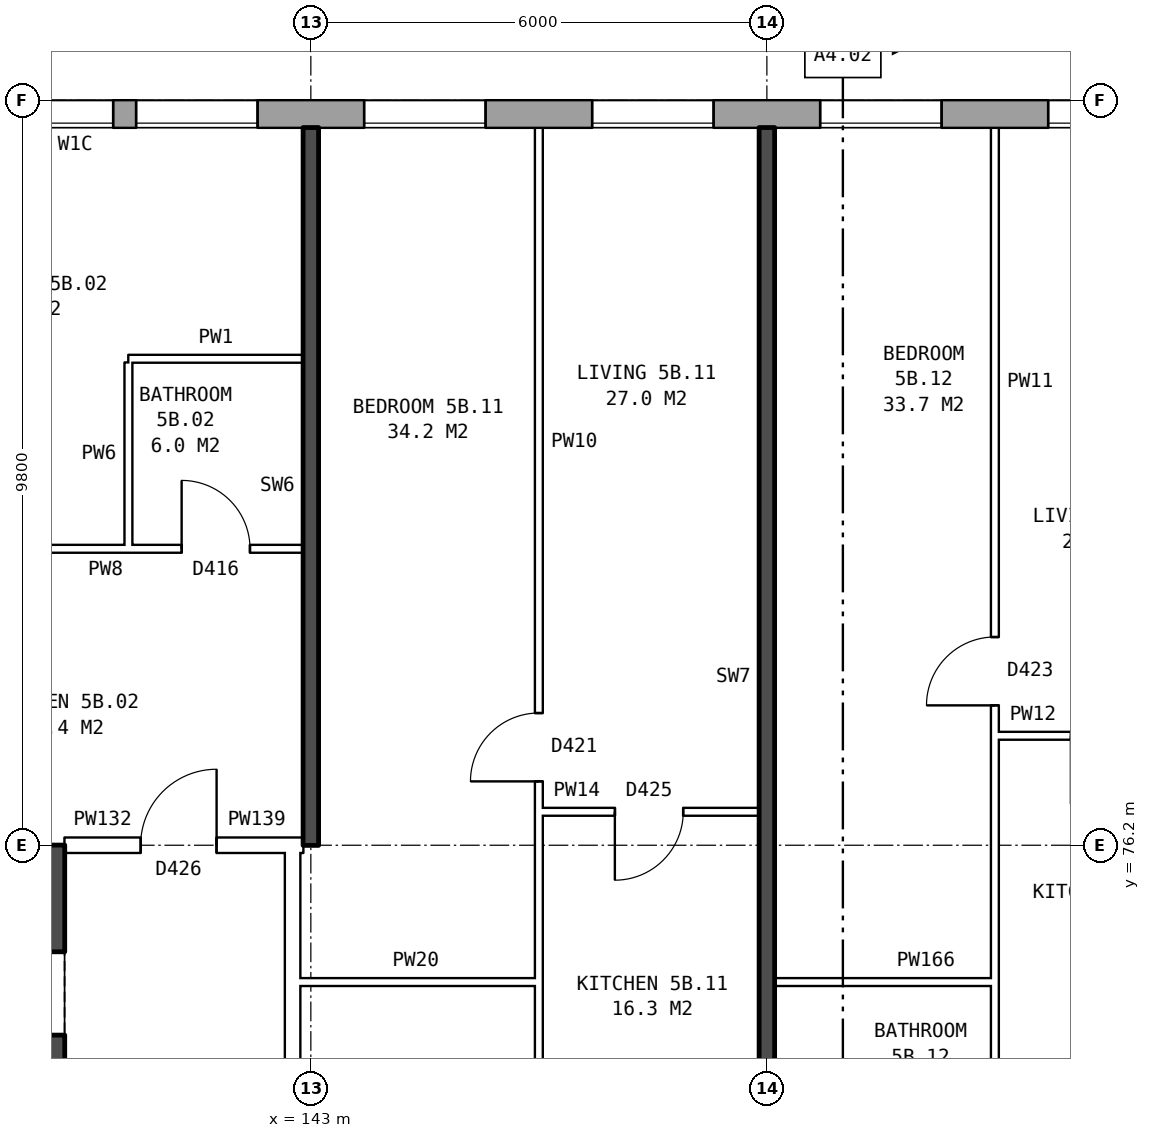
"""IFC4 building model, lengths in metres.
Left out: names, types, materials, properties, quantities, classifications, styles, units other than length and angle.
Written with IfcOpenShell. Run it as: python <this file> out.ifc"""

import sys

from ifc_helpers import new_model, si_unit, direction, frame, frame_2d, origin, place, context, subcontext, project, spatial, rectangle, extrude, element, fill, save


model = new_model("IFC4")
c1 = context("Model", 3, precision=1e-05, world=origin(), true_north=direction((0.0, 1.0)))
c2 = subcontext(c1, "Body", "Model", "MODEL_VIEW")
j1 = project(units=[si_unit("LENGTHUNIT", "METRE"), si_unit("PLANEANGLEUNIT", "RADIAN")], contexts=[c1])
p1 = place(None, origin())
s1 = spatial("IfcSite", under=j1, at=p1, CompositionType="ELEMENT")
p2 = place(p1, origin())
s2 = spatial("IfcBuilding", under=s1, at=p2, CompositionType="ELEMENT")
p3 = place(p2, frame((0.0, 0.0, 22.6)))
s3 = spatial("IfcBuildingStorey", under=s2, at=p3, CompositionType="ELEMENT", Elevation=22.6)
p4 = place(p3, frame((174.675, 85.82, 0.0), z_axis=(0.0, 0.0, 1.0), x_axis=(-1.0, 0.0, 0.0)))
e1 = element("IfcWall", 1, at=p4, inside=s3, PredefinedType="STANDARD", context=c2, shape_type="SweptSolid", body=[
    extrude(rectangle(XDim=40.601, YDim=0.36, at=frame_2d((20.3, 0.0))), origin(), (0.0, 0.0, 1.0), 2.85),
])
p5 = place(p4, frame((1.875, 0.0, 1.7)))
e2 = element("IfcOpeningElement", 2, at=p5, cuts=e1, PredefinedType="OPENING", context=c2, shape_type="SweptSolid", body=[
    extrude(rectangle(XDim=1.0, YDim=0.9, at=frame_2d((0.5, 0.45))), frame((0.0, 0.19, 0.0), z_axis=(0.0, -1.0, 0.0), x_axis=(1.0, 0.0, 0.0)), (0.0, 0.0, 1.0), 0.38),
])
p6 = place(p4, frame((5.375, 0.0, 0.8)))
e3 = element("IfcOpeningElement", 3, at=p6, cuts=e1, PredefinedType="OPENING", context=c2, shape_type="SweptSolid", body=[
    extrude(rectangle(XDim=1.6, YDim=1.8, at=frame_2d((0.8, 0.9))), frame((0.0, 0.19, 0.0), z_axis=(0.0, -1.0, 0.0), x_axis=(1.0, 0.0, 0.0)), (0.0, 0.0, 1.0), 0.38),
])
p7 = place(p4, frame((8.375, 0.0, 0.8)))
e4 = element("IfcOpeningElement", 4, at=p7, cuts=e1, PredefinedType="OPENING", context=c2, shape_type="SweptSolid", body=[
    extrude(rectangle(XDim=1.6, YDim=1.8, at=frame_2d((0.8, 0.9))), frame((0.0, 0.19, 0.0), z_axis=(0.0, -1.0, 0.0), x_axis=(1.0, 0.0, 0.0)), (0.0, 0.0, 1.0), 0.38),
])
p8 = place(p4, frame((11.375, 0.0, 0.8)))
e5 = element("IfcOpeningElement", 5, at=p8, cuts=e1, PredefinedType="OPENING", context=c2, shape_type="SweptSolid", body=[
    extrude(rectangle(XDim=1.6, YDim=1.8, at=frame_2d((0.8, 0.9))), frame((0.0, 0.19, 0.0), z_axis=(0.0, -1.0, 0.0), x_axis=(1.0, 0.0, 0.0)), (0.0, 0.0, 1.0), 0.38),
])
p9 = place(p4, frame((14.375, 0.0, 0.8)))
e6 = element("IfcOpeningElement", 6, at=p9, cuts=e1, PredefinedType="OPENING", context=c2, shape_type="SweptSolid", body=[
    extrude(rectangle(XDim=1.6, YDim=1.8, at=frame_2d((0.8, 0.9))), frame((0.0, 0.19, 0.0), z_axis=(0.0, -1.0, 0.0), x_axis=(1.0, 0.0, 0.0)), (0.0, 0.0, 1.0), 0.38),
])
p10 = place(p4, frame((17.375, 0.0, 0.8)))
e7 = element("IfcOpeningElement", 7, at=p10, cuts=e1, PredefinedType="OPENING", context=c2, shape_type="SweptSolid", body=[
    extrude(rectangle(XDim=1.6, YDim=1.8, at=frame_2d((0.8, 0.9))), frame((0.0, 0.19, 0.0), z_axis=(0.0, -1.0, 0.0), x_axis=(1.0, 0.0, 0.0)), (0.0, 0.0, 1.0), 0.38),
])
p11 = place(p4, frame((20.375, 0.0, 0.8)))
e8 = element("IfcOpeningElement", 8, at=p11, cuts=e1, PredefinedType="OPENING", context=c2, shape_type="SweptSolid", body=[
    extrude(rectangle(XDim=1.6, YDim=1.8, at=frame_2d((0.8, 0.9))), frame((0.0, 0.19, 0.0), z_axis=(0.0, -1.0, 0.0), x_axis=(1.0, 0.0, 0.0)), (0.0, 0.0, 1.0), 0.38),
])
p12 = place(p4, frame((23.375, 0.0, 0.8)))
e9 = element("IfcOpeningElement", 9, at=p12, cuts=e1, PredefinedType="OPENING", context=c2, shape_type="SweptSolid", body=[
    extrude(rectangle(XDim=1.6, YDim=1.8, at=frame_2d((0.8, 0.9))), frame((0.0, 0.19, 0.0), z_axis=(0.0, -1.0, 0.0), x_axis=(1.0, 0.0, 0.0)), (0.0, 0.0, 1.0), 0.38),
])
p13 = place(p4, frame((26.375, 0.0, 0.8)))
e10 = element("IfcOpeningElement", 10, at=p13, cuts=e1, PredefinedType="OPENING", context=c2, shape_type="SweptSolid", body=[
    extrude(rectangle(XDim=1.6, YDim=1.8, at=frame_2d((0.8, 0.9))), frame((0.0, 0.19, 0.0), z_axis=(0.0, -1.0, 0.0), x_axis=(1.0, 0.0, 0.0)), (0.0, 0.0, 1.0), 0.38),
])
p14 = place(p4, frame((29.375, 0.0, 0.8)))
e11 = element("IfcOpeningElement", 11, at=p14, cuts=e1, PredefinedType="OPENING", context=c2, shape_type="SweptSolid", body=[
    extrude(rectangle(XDim=1.6, YDim=1.8, at=frame_2d((0.8, 0.9))), frame((0.0, 0.19, 0.0), z_axis=(0.0, -1.0, 0.0), x_axis=(1.0, 0.0, 0.0)), (0.0, 0.0, 1.0), 0.38),
])
p15 = place(p4, frame((32.375, 0.0, 0.8)))
e12 = element("IfcOpeningElement", 12, at=p15, cuts=e1, PredefinedType="OPENING", context=c2, shape_type="SweptSolid", body=[
    extrude(rectangle(XDim=1.6, YDim=1.8, at=frame_2d((0.8, 0.9))), frame((0.0, 0.19, 0.0), z_axis=(0.0, -1.0, 0.0), x_axis=(1.0, 0.0, 0.0)), (0.0, 0.0, 1.0), 0.38),
])
p16 = place(p4, frame((34.275, 0.0, 0.8)))
e13 = element("IfcOpeningElement", 13, at=p16, cuts=e1, PredefinedType="OPENING", context=c2, shape_type="SweptSolid", body=[
    extrude(rectangle(XDim=1.0, YDim=1.8, at=frame_2d((0.5, 0.9))), frame((0.0, 0.19, 0.0), z_axis=(0.0, -1.0, 0.0), x_axis=(1.0, 0.0, 0.0)), (0.0, 0.0, 1.0), 0.38),
])
p17 = place(p4, frame((37.875, 0.0, 1.6)))
e14 = element("IfcOpeningElement", 14, at=p17, cuts=e1, PredefinedType="OPENING", context=c2, shape_type="SweptSolid", body=[
    extrude(rectangle(XDim=0.6, YDim=0.9, at=frame_2d((0.3, 0.45))), frame((0.0, 0.19, 0.0), z_axis=(0.0, -1.0, 0.0), x_axis=(1.0, 0.0, 0.0)), (0.0, 0.0, 1.0), 0.38),
])
p18 = place(p4, frame((4.125, 0.0, 0.8)))
e15 = element("IfcOpeningElement", 15, at=p18, cuts=e1, PredefinedType="OPENING", context=c2, shape_type="SweptSolid", body=[
    extrude(rectangle(XDim=0.8, YDim=0.9, at=frame_2d((0.4, 0.45))), frame((0.0, 0.19, 0.0), z_axis=(0.0, -1.0, 0.0), x_axis=(1.0, 0.0, 0.0)), (0.0, 0.0, 1.0), 0.38),
])
p19 = place(p4, frame((35.575, 0.0, 0.8)))
e16 = element("IfcOpeningElement", 16, at=p19, cuts=e1, PredefinedType="OPENING", context=c2, shape_type="SweptSolid", body=[
    extrude(rectangle(XDim=0.8, YDim=0.9, at=frame_2d((0.4, 0.45))), frame((0.0, 0.19, 0.0), z_axis=(0.0, -1.0, 0.0), x_axis=(1.0, 0.0, 0.0)), (0.0, 0.0, 1.0), 0.38),
])
p20 = place(p4, frame((38.875, 0.0, 0.8)))
e17 = element("IfcOpeningElement", 17, at=p20, cuts=e1, PredefinedType="OPENING", context=c2, shape_type="SweptSolid", body=[
    extrude(rectangle(XDim=1.4, YDim=1.8, at=frame_2d((0.7, 0.9))), frame((0.0, 0.19, 0.0), z_axis=(0.0, -1.0, 0.0), x_axis=(1.0, 0.0, 0.0)), (0.0, 0.0, 1.0), 0.38),
])
p21 = place(p3, frame((139.31, 64.7, 0.0), z_axis=(0.0, 0.0, 1.0), x_axis=(0.0, 1.0, 0.0)))
e18 = element("IfcWall", 18, at=p21, inside=s3, PredefinedType="SHEAR", context=c2, shape_type="SweptSolid", body=[
    extrude(rectangle(XDim=10.6, YDim=0.9, at=frame_2d((5.3, 0.0))), origin(), (0.0, 0.0, 1.0), 2.85),
])
p22 = place(p21, frame((0.425, 0.0, 0.0)))
e19 = element("IfcOpeningElement", 19, at=p22, cuts=e18, PredefinedType="OPENING", context=c2, shape_type="SweptSolid", body=[
    extrude(rectangle(XDim=1.1, YDim=2.1, at=frame_2d((0.55, 1.05))), frame((0.0, 0.46, 0.0), z_axis=(0.0, -1.0, 0.0), x_axis=(1.0, 0.0, 0.0)), (0.0, 0.0, 1.0), 0.92),
])
p23 = place(p21, frame((9.0, 0.0, 0.0)))
e20 = element("IfcOpeningElement", 20, at=p23, cuts=e18, PredefinedType="OPENING", context=c2, shape_type="SweptSolid", body=[
    extrude(rectangle(XDim=1.1, YDim=2.1, at=frame_2d((0.55, 1.05))), frame((0.0, 0.46, 0.0), z_axis=(0.0, -1.0, 0.0), x_axis=(1.0, 0.0, 0.0)), (0.0, 0.0, 1.0), 0.92),
])
p24 = place(p21, frame((7.225, 0.0, 0.0)))
e21 = element("IfcOpeningElement", 21, at=p24, cuts=e18, PredefinedType="OPENING", context=c2, shape_type="SweptSolid", body=[
    extrude(rectangle(XDim=0.85, YDim=2.1, at=frame_2d((0.425, 1.05))), frame((0.0, 0.46, 0.0), z_axis=(0.0, -1.0, 0.0), x_axis=(1.0, 0.0, 0.0)), (0.0, 0.0, 1.0), 0.92),
])
p25 = place(p3, frame((139.76, 75.75, 0.0), z_axis=(0.0, 0.0, 1.0), x_axis=(-1.0, 0.0, 0.0)))
e22 = element("IfcWall", 22, at=p25, inside=s3, PredefinedType="SHEAR", context=c2, shape_type="SweptSolid", body=[
    extrude(rectangle(XDim=8.4, YDim=0.9, at=frame_2d((4.2, 0.0))), origin(), (0.0, 0.0, 1.0), 2.85),
])
p26 = place(p3, frame((142.76, 63.9, 0.0), z_axis=(0.0, 0.0, 1.0), x_axis=(0.0, 1.0, 0.0)))
e23 = element("IfcWall", 23, at=p26, inside=s3, PredefinedType="PARTITIONING", context=c2, shape_type="SweptSolid", body=[
    extrude(rectangle(XDim=12.2, YDim=0.2, at=frame_2d((6.1, 0.0))), origin(), (0.0, 0.0, 1.0), 2.85),
])
p27 = place(p26, frame((5.1, 0.0, 0.0)))
e24 = element("IfcOpeningElement", 24, at=p27, cuts=e23, PredefinedType="OPENING", context=c2, shape_type="SweptSolid", body=[
    extrude(rectangle(XDim=2.0, YDim=2.1, at=frame_2d((1.0, 1.05))), frame((0.0, 0.11, 0.0), z_axis=(0.0, -1.0, 0.0), x_axis=(1.0, 0.0, 0.0)), (0.0, 0.0, 1.0), 0.22),
])
p28 = place(p3, frame((142.76, 74.4, 0.0), z_axis=(0.0, 0.0, 1.0), x_axis=(1.0, 0.0, 0.0)))
e25 = element("IfcWall", 25, at=p28, inside=s3, PredefinedType="PARTITIONING", context=c2, shape_type="SweptSolid", body=[
    extrude(rectangle(XDim=3.24, YDim=0.1, at=frame_2d((1.62, 0.0))), origin(), (0.0, 0.0, 1.0), 2.85),
])
p29 = place(p3, frame((149.1, 74.4, 0.0), z_axis=(0.0, 0.0, 1.0), x_axis=(1.0, 0.0, 0.0)))
e26 = element("IfcWall", 26, at=p29, inside=s3, PredefinedType="PARTITIONING", context=c2, shape_type="SweptSolid", body=[
    extrude(rectangle(XDim=2.9, YDim=0.1, at=frame_2d((1.45, 0.0))), origin(), (0.0, 0.0, 1.0), 2.85),
])
p30 = place(p3, frame((139.76, 76.2, 0.0), z_axis=(0.0, 0.0, 1.0), x_axis=(1.0, 0.0, 0.0)))
e27 = element("IfcWall", 27, at=p30, inside=s3, PredefinedType="PARTITIONING", context=c2, shape_type="SweptSolid", body=[
    extrude(rectangle(XDim=3.0, YDim=0.2, at=frame_2d((1.5, 0.0))), origin(), (0.0, 0.0, 1.0), 2.85),
])
p31 = place(p30, frame((1.0, 0.0, 0.0)))
e28 = element("IfcOpeningElement", 28, at=p31, cuts=e27, PredefinedType="OPENING", context=c2, shape_type="SweptSolid", body=[
    extrude(rectangle(XDim=1.0, YDim=2.1, at=frame_2d((0.5, 1.05))), frame((0.0, 0.11, 0.0), z_axis=(0.0, -1.0, 0.0), x_axis=(1.0, 0.0, 0.0)), (0.0, 0.0, 1.0), 0.22),
])
p32 = place(p3, frame((142.76, 76.2, 0.0), z_axis=(0.0, 0.0, 1.0), x_axis=(1.0, 0.0, 0.0)))
e29 = element("IfcWall", 29, at=p32, inside=s3, PredefinedType="PARTITIONING", context=c2, shape_type="SweptSolid", body=[
    extrude(rectangle(XDim=0.14, YDim=0.2, at=frame_2d((0.07, 0.0))), origin(), (0.0, 0.0, 1.0), 2.85),
])
p33 = place(p3, frame((146.0, 76.64, 0.0), z_axis=(0.0, 0.0, 1.0), x_axis=(1.0, 0.0, 0.0)))
e30 = element("IfcWall", 30, at=p33, inside=s3, PredefinedType="PARTITIONING", context=c2, shape_type="SweptSolid", body=[
    extrude(rectangle(XDim=2.9, YDim=0.1, at=frame_2d((1.45, 0.0))), origin(), (0.0, 0.0, 1.0), 2.85),
])
p34 = place(p33, frame((1.0, 0.0, 0.0)))
e31 = element("IfcOpeningElement", 31, at=p34, cuts=e30, PredefinedType="OPENING", context=c2, shape_type="SweptSolid", body=[
    extrude(rectangle(XDim=0.9, YDim=2.1, at=frame_2d((0.45, 1.05))), frame((0.0, 0.06, 0.0), z_axis=(0.0, -1.0, 0.0), x_axis=(1.0, 0.0, 0.0)), (0.0, 0.0, 1.0), 0.12),
])
p35 = place(p3, frame((152.0, 77.64, 0.0), z_axis=(0.0, 0.0, 1.0), x_axis=(1.0, 0.0, 0.0)))
e32 = element("IfcWall", 32, at=p35, inside=s3, PredefinedType="PARTITIONING", context=c2, shape_type="SweptSolid", body=[
    extrude(rectangle(XDim=2.9, YDim=0.1, at=frame_2d((1.45, 0.0))), origin(), (0.0, 0.0, 1.0), 2.85),
])
p36 = place(p35, frame((1.0, 0.0, 0.0)))
e33 = element("IfcOpeningElement", 33, at=p36, cuts=e32, PredefinedType="OPENING", context=c2, shape_type="SweptSolid", body=[
    extrude(rectangle(XDim=0.9, YDim=2.1, at=frame_2d((0.45, 1.05))), frame((0.0, 0.06, 0.0), z_axis=(0.0, -1.0, 0.0), x_axis=(1.0, 0.0, 0.0)), (0.0, 0.0, 1.0), 0.12),
])
p37 = place(p3, frame((137.1, 80.1, 0.0), z_axis=(0.0, 0.0, 1.0), x_axis=(1.0, 0.0, 0.0)))
e34 = element("IfcWall", 34, at=p37, inside=s3, PredefinedType="PARTITIONING", context=c2, shape_type="SweptSolid", body=[
    extrude(rectangle(XDim=5.8, YDim=0.1, at=frame_2d((2.9, 0.0))), origin(), (0.0, 0.0, 1.0), 2.85),
])
p38 = place(p37, frame((1.3, 0.0, 0.0)))
e35 = element("IfcOpeningElement", 35, at=p38, cuts=e34, PredefinedType="OPENING", context=c2, shape_type="SweptSolid", body=[
    extrude(rectangle(XDim=0.9, YDim=2.1, at=frame_2d((0.45, 1.05))), frame((0.0, 0.06, 0.0), z_axis=(0.0, -1.0, 0.0), x_axis=(1.0, 0.0, 0.0)), (0.0, 0.0, 1.0), 0.12),
])
p39 = place(p37, frame((4.2, 0.0, 0.0)))
e36 = element("IfcOpeningElement", 36, at=p39, cuts=e34, PredefinedType="OPENING", context=c2, shape_type="SweptSolid", body=[
    extrude(rectangle(XDim=0.9, YDim=2.1, at=frame_2d((0.45, 1.05))), frame((0.0, 0.06, 0.0), z_axis=(0.0, -1.0, 0.0), x_axis=(1.0, 0.0, 0.0)), (0.0, 0.0, 1.0), 0.12),
])
p40 = place(p3, frame((140.6, 82.6, 0.0), z_axis=(0.0, 0.0, 1.0), x_axis=(1.0, 0.0, 0.0)))
e37 = element("IfcWall", 37, at=p40, inside=s3, PredefinedType="PARTITIONING", context=c2, shape_type="SweptSolid", body=[
    extrude(rectangle(XDim=2.3, YDim=0.1, at=frame_2d((1.15, 0.0))), origin(), (0.0, 0.0, 1.0), 2.85),
])
p41 = place(p3, frame((140.6, 80.15, 0.0), z_axis=(0.0, 0.0, 1.0), x_axis=(0.0, 1.0, 0.0)))
e38 = element("IfcWall", 38, at=p41, inside=s3, PredefinedType="PARTITIONING", context=c2, shape_type="SweptSolid", body=[
    extrude(rectangle(XDim=2.4, YDim=0.1, at=frame_2d((1.2, 0.0))), origin(), (0.0, 0.0, 1.0), 2.85),
])
p42 = place(p3, frame((143.0, 76.2, 0.0), z_axis=(0.0, 0.0, 1.0), x_axis=(0.0, 1.0, 0.0)))
e39 = element("IfcWall", 39, at=p42, inside=s3, PredefinedType="SOLIDWALL", context=c2, shape_type="SweptSolid", body=[
    extrude(rectangle(XDim=9.44, YDim=0.2, at=frame_2d((4.72, 0.0))), origin(), (0.0, 0.0, 1.0), 2.85),
])
p43 = place(p3, frame((146.0, 71.3, 0.0), z_axis=(0.0, 0.0, 1.0), x_axis=(0.0, 1.0, 0.0)))
e40 = element("IfcWall", 40, at=p43, inside=s3, PredefinedType="PARTITIONING", context=c2, shape_type="SweptSolid", body=[
    extrude(rectangle(XDim=14.34, YDim=0.1, at=frame_2d((7.17, 0.0))), origin(), (0.0, 0.0, 1.0), 2.85),
])
p44 = place(p43, frame((5.74, 0.0, 0.0)))
e41 = element("IfcOpeningElement", 41, at=p44, cuts=e40, PredefinedType="OPENING", context=c2, shape_type="SweptSolid", body=[
    extrude(rectangle(XDim=0.9, YDim=2.1, at=frame_2d((0.45, 1.05))), frame((0.0, 0.06, 0.0), z_axis=(0.0, -1.0, 0.0), x_axis=(1.0, 0.0, 0.0)), (0.0, 0.0, 1.0), 0.12),
])
p45 = place(p43, frame((0.4, 0.0, 0.0)))
e42 = element("IfcOpeningElement", 42, at=p45, cuts=e40, PredefinedType="OPENING", context=c2, shape_type="SweptSolid", body=[
    extrude(rectangle(XDim=0.9, YDim=2.1, at=frame_2d((0.45, 1.05))), frame((0.0, 0.06, 0.0), z_axis=(0.0, -1.0, 0.0), x_axis=(1.0, 0.0, 0.0)), (0.0, 0.0, 1.0), 0.12),
])
p46 = place(p3, frame((149.0, 71.2, 0.0), z_axis=(0.0, 0.0, 1.0), x_axis=(0.0, 1.0, 0.0)))
e43 = element("IfcWall", 43, at=p46, inside=s3, PredefinedType="SOLIDWALL", context=c2, shape_type="SweptSolid", body=[
    extrude(rectangle(XDim=14.44, YDim=0.2, at=frame_2d((7.22, 0.0))), origin(), (0.0, 0.0, 1.0), 2.85),
])
p47 = place(p3, frame((152.0, 71.3, 0.0), z_axis=(0.0, 0.0, 1.0), x_axis=(0.0, 1.0, 0.0)))
e44 = element("IfcWall", 44, at=p47, inside=s3, PredefinedType="PARTITIONING", context=c2, shape_type="SweptSolid", body=[
    extrude(rectangle(XDim=14.34, YDim=0.1, at=frame_2d((7.17, 0.0))), origin(), (0.0, 0.0, 1.0), 2.85),
])
p48 = place(p47, frame((6.74, 0.0, 0.0)))
e45 = element("IfcOpeningElement", 45, at=p48, cuts=e44, PredefinedType="OPENING", context=c2, shape_type="SweptSolid", body=[
    extrude(rectangle(XDim=0.9, YDim=2.1, at=frame_2d((0.45, 1.05))), frame((0.0, 0.06, 0.0), z_axis=(0.0, -1.0, 0.0), x_axis=(1.0, 0.0, 0.0)), (0.0, 0.0, 1.0), 0.12),
])
p49 = place(p47, frame((0.4, 0.0, 0.0)))
e46 = element("IfcOpeningElement", 46, at=p49, cuts=e44, PredefinedType="OPENING", context=c2, shape_type="SweptSolid", body=[
    extrude(rectangle(XDim=0.9, YDim=2.1, at=frame_2d((0.45, 1.05))), frame((0.0, 0.06, 0.0), z_axis=(0.0, -1.0, 0.0), x_axis=(1.0, 0.0, 0.0)), (0.0, 0.0, 1.0), 0.12),
])
p50 = place(p11, origin())
e47 = element("IfcWindow", 47, at=p50, inside=s3, PartitioningType="SINGLE_PANEL", PredefinedType="WINDOW", context=c2, shape_type="SweptSolid", body=[
    extrude(rectangle(XDim=1.6, YDim=1.8, at=frame_2d((0.8, 0.9))), frame((0.0, 0.15, 0.0), z_axis=(0.0, -1.0, 0.0), x_axis=(1.0, 0.0, 0.0)), (0.0, 0.0, 1.0), 0.06),
])
fill(e8, e47)
p51 = place(p12, origin())
e48 = element("IfcWindow", 48, at=p51, inside=s3, PartitioningType="SINGLE_PANEL", PredefinedType="WINDOW", context=c2, shape_type="SweptSolid", body=[
    extrude(rectangle(XDim=1.6, YDim=1.8, at=frame_2d((0.8, 0.9))), frame((0.0, 0.15, 0.0), z_axis=(0.0, -1.0, 0.0), x_axis=(1.0, 0.0, 0.0)), (0.0, 0.0, 1.0), 0.06),
])
fill(e9, e48)
p52 = place(p13, origin())
e49 = element("IfcWindow", 49, at=p52, inside=s3, PartitioningType="SINGLE_PANEL", PredefinedType="WINDOW", context=c2, shape_type="SweptSolid", body=[
    extrude(rectangle(XDim=1.6, YDim=1.8, at=frame_2d((0.8, 0.9))), frame((0.0, 0.15, 0.0), z_axis=(0.0, -1.0, 0.0), x_axis=(1.0, 0.0, 0.0)), (0.0, 0.0, 1.0), 0.06),
])
fill(e10, e49)
p53 = place(p14, origin())
e50 = element("IfcWindow", 50, at=p53, inside=s3, PartitioningType="SINGLE_PANEL", PredefinedType="WINDOW", context=c2, shape_type="SweptSolid", body=[
    extrude(rectangle(XDim=1.6, YDim=1.8, at=frame_2d((0.8, 0.9))), frame((0.0, 0.15, 0.0), z_axis=(0.0, -1.0, 0.0), x_axis=(1.0, 0.0, 0.0)), (0.0, 0.0, 1.0), 0.06),
])
fill(e11, e50)
p54 = place(p15, origin())
e51 = element("IfcWindow", 51, at=p54, inside=s3, PartitioningType="SINGLE_PANEL", PredefinedType="WINDOW", context=c2, shape_type="SweptSolid", body=[
    extrude(rectangle(XDim=1.6, YDim=1.8, at=frame_2d((0.8, 0.9))), frame((0.0, 0.15, 0.0), z_axis=(0.0, -1.0, 0.0), x_axis=(1.0, 0.0, 0.0)), (0.0, 0.0, 1.0), 0.06),
])
fill(e12, e51)
p55 = place(p16, origin())
e52 = element("IfcWindow", 52, at=p55, inside=s3, PartitioningType="SINGLE_PANEL", PredefinedType="WINDOW", context=c2, shape_type="SweptSolid", body=[
    extrude(rectangle(XDim=1.0, YDim=1.8, at=frame_2d((0.5, 0.9))), frame((0.0, 0.15, 0.0), z_axis=(0.0, -1.0, 0.0), x_axis=(1.0, 0.0, 0.0)), (0.0, 0.0, 1.0), 0.06),
])
fill(e13, e52)
p56 = place(p31, origin())
e53 = element("IfcDoor", 53, at=p56, inside=s3, OperationType="SINGLE_SWING_RIGHT", PredefinedType="DOOR", context=c2, shape_type="SweptSolid", body=[
    extrude(rectangle(XDim=1.0, YDim=2.1, at=frame_2d((0.5, 1.05))), frame((0.0, 0.025, 0.0), z_axis=(0.0, -1.0, 0.0), x_axis=(1.0, 0.0, 0.0)), (0.0, 0.0, 1.0), 0.05),
])
fill(e28, e53)
p57 = place(p39, origin())
e54 = element("IfcDoor", 54, at=p57, inside=s3, OperationType="SINGLE_SWING_LEFT", PredefinedType="DOOR", context=c2, shape_type="SweptSolid", body=[
    extrude(rectangle(XDim=0.9, YDim=2.1, at=frame_2d((0.45, 1.05))), frame((0.0, 0.025, 0.0), z_axis=(0.0, -1.0, 0.0), x_axis=(1.0, 0.0, 0.0)), (0.0, 0.0, 1.0), 0.05),
])
fill(e36, e54)
p58 = place(p44, origin())
e55 = element("IfcDoor", 55, at=p58, inside=s3, OperationType="SINGLE_SWING_LEFT", PredefinedType="DOOR", context=c2, shape_type="SweptSolid", body=[
    extrude(rectangle(XDim=0.9, YDim=2.1, at=frame_2d((0.45, 1.05))), frame((0.0, 0.025, 0.0), z_axis=(0.0, -1.0, 0.0), x_axis=(1.0, 0.0, 0.0)), (0.0, 0.0, 1.0), 0.05),
])
fill(e41, e55)
p59 = place(p34, frame((0.9, 0.0, 0.0), z_axis=(0.0, 0.0, 1.0), x_axis=(-1.0, 0.0, 0.0)))
e56 = element("IfcDoor", 56, at=p59, inside=s3, OperationType="SINGLE_SWING_RIGHT", PredefinedType="DOOR", context=c2, shape_type="SweptSolid", body=[
    extrude(rectangle(XDim=0.9, YDim=2.1, at=frame_2d((0.45, 1.05))), frame((0.0, 0.025, 0.0), z_axis=(0.0, -1.0, 0.0), x_axis=(1.0, 0.0, 0.0)), (0.0, 0.0, 1.0), 0.05),
])
fill(e31, e56)
p60 = place(p48, origin())
e57 = element("IfcDoor", 57, at=p60, inside=s3, OperationType="SINGLE_SWING_LEFT", PredefinedType="DOOR", context=c2, shape_type="SweptSolid", body=[
    extrude(rectangle(XDim=0.9, YDim=2.1, at=frame_2d((0.45, 1.05))), frame((0.0, 0.025, 0.0), z_axis=(0.0, -1.0, 0.0), x_axis=(1.0, 0.0, 0.0)), (0.0, 0.0, 1.0), 0.05),
])
fill(e45, e57)
save(model, sys.argv[1])
